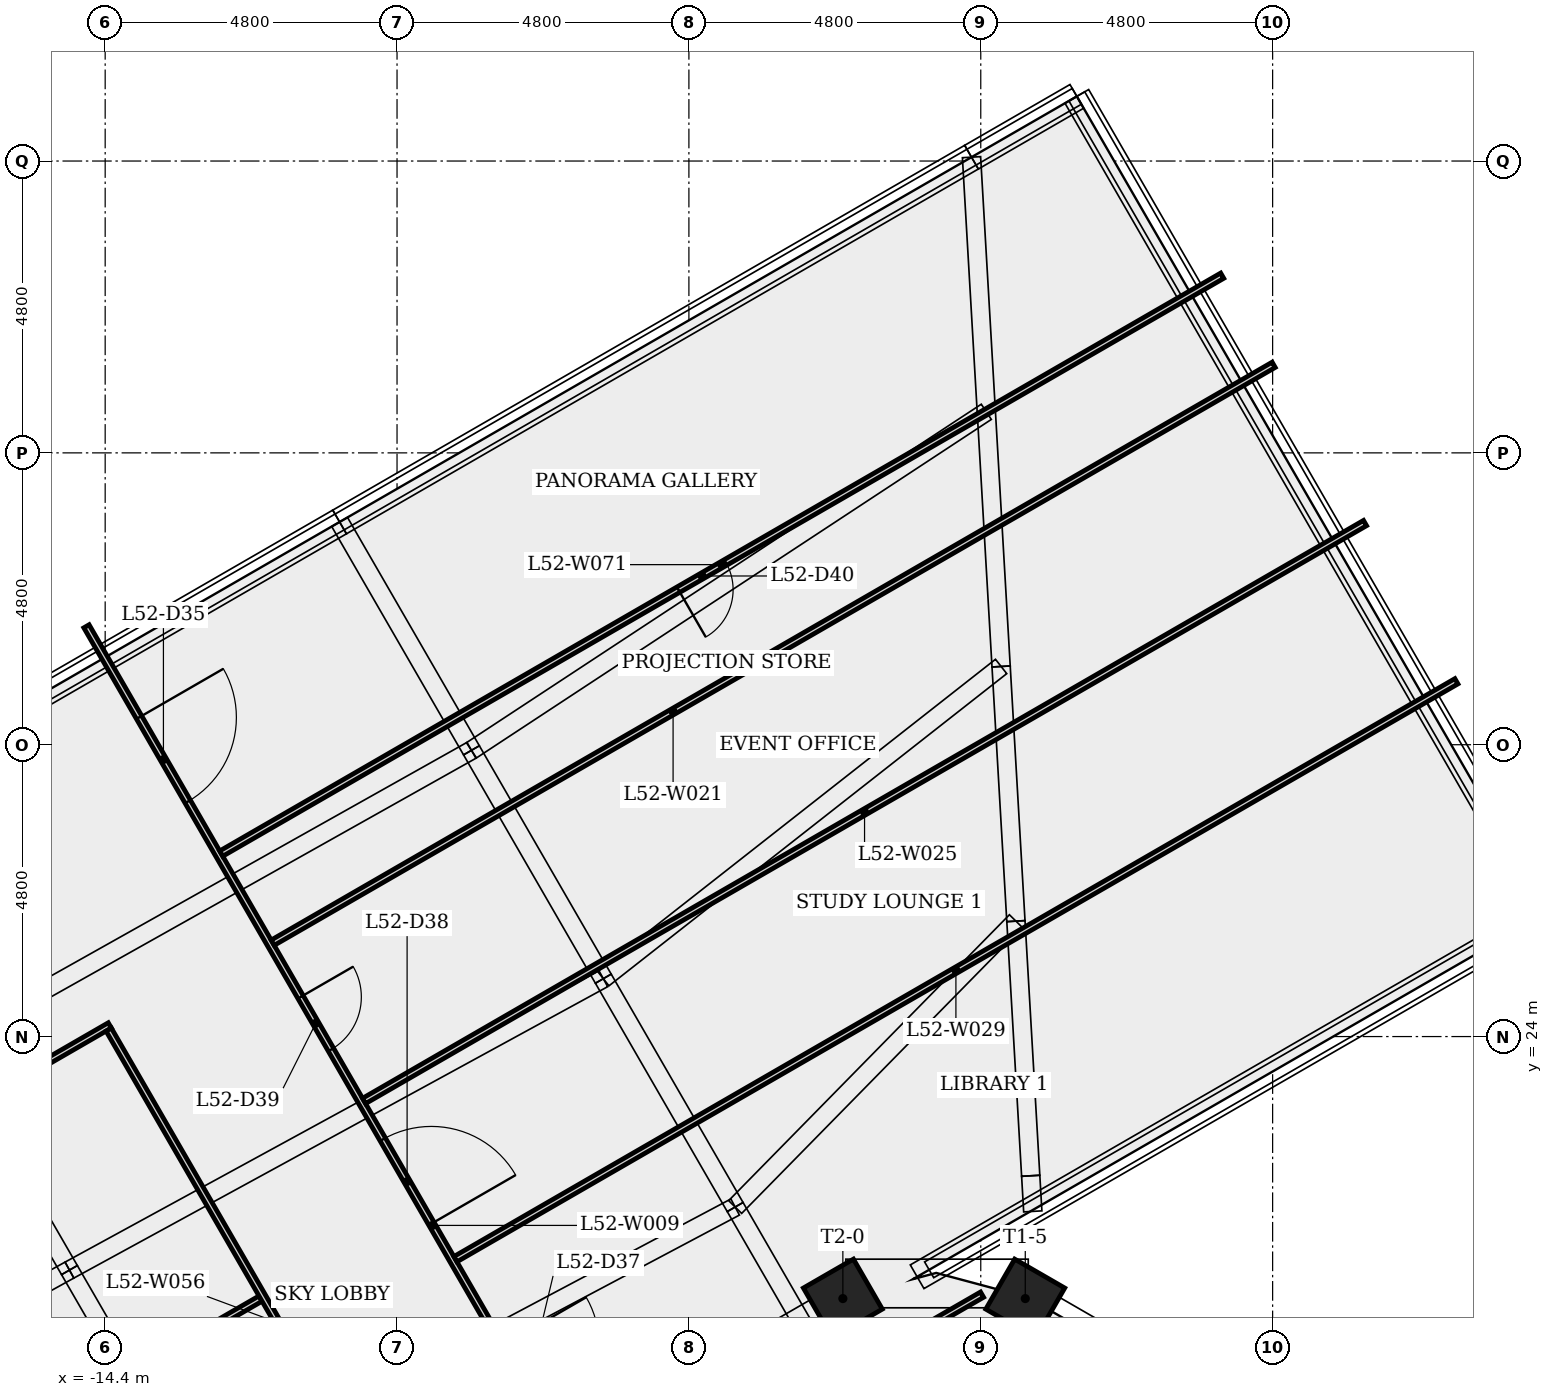
"""IFC4 building model, lengths in metres.
Left out: names, types, materials, properties, quantities, classifications, styles, units other than length and angle.
Written with IfcOpenShell. Run it as: python <this file> out.ifc"""

import sys

from ifc_helpers import new_model, si_unit, direction, frame, frame_2d, origin, origin_2d, place, context, subcontext, project, spatial, rectangle, extrude, element, fill, save


model = new_model("IFC4")
c1 = context("Model", 3, precision=1e-05, world=origin(), true_north=direction((0.0, 1.0)))
c2 = subcontext(c1, "Body", "Model", "MODEL_VIEW")
j1 = project(units=[si_unit("LENGTHUNIT", "METRE"), si_unit("PLANEANGLEUNIT", "RADIAN")], contexts=[c1])
p1 = place(None, origin())
s1 = spatial("IfcSite", under=j1, at=p1, CompositionType="ELEMENT")
p2 = place(p1, origin())
s2 = spatial("IfcBuilding", under=s1, at=p2, CompositionType="ELEMENT")
p3 = place(p2, frame((0.0, 0.0, 194.7)))
s3 = spatial("IfcBuildingStorey", under=s2, at=p3, CompositionType="ELEMENT", Elevation=194.7)
for number, where, z_axis, x_axis in (
    (1, (0.732, 19.691, 0.0), (0.0, 0.0, 1.0), (0.5, 0.866, 0.0)),
    (2, (-2.268, 19.691, 0.0), (0.0, 0.0, 1.0), (-0.5, 0.866, 0.0)),
):
    element("IfcColumn", number, at=place(p3, frame(where, z_axis=z_axis, x_axis=x_axis)), inside=s3, PredefinedType="COLUMN", context=c2, shape_type="SweptSolid", body=[
        extrude(rectangle(XDim=0.95, YDim=0.95, at=origin_2d()), origin(), (0.0, 0.0, 1.0), 4.0),
    ])
p4 = place(p3, frame((-26.639, 11.149, 0.0), z_axis=(0.0, 0.0, 1.0), x_axis=(0.866027084608, 0.499997088717, 0.0)))
e3 = element("IfcWall", 3, at=p4, inside=s3, PredefinedType="PARTITIONING", context=c2, shape_type="SweptSolid", body=[
    extrude(rectangle(XDim=17.083, YDim=0.1, at=frame_2d((8.542, 0.0))), origin(), (0.0, 0.0, 1.0), 3.65),
])
p5 = place(p3, frame((-14.324, 24.184, 0.0), z_axis=(0.0, 0.0, 1.0), x_axis=(-0.866026824701, -0.499997538892, 0.0)))
e4 = element("IfcWall", 4, at=p5, inside=s3, PredefinedType="PARTITIONING", context=c2, shape_type="SweptSolid", body=[
    extrude(rectangle(XDim=17.183, YDim=0.1, at=frame_2d((8.592, 0.0))), origin(), (0.0, 0.0, 1.0), 3.65),
])
p6 = place(p5, frame((7.444, 0.0, 0.0)))
e5 = element("IfcOpeningElement", 5, at=p6, cuts=e4, PredefinedType="OPENING", context=c2, shape_type="SweptSolid", body=[
    extrude(rectangle(XDim=1.6, YDim=2.1, at=frame_2d((0.8, 1.05))), frame((0.0, 0.06, 0.0), z_axis=(0.0, -1.0, 0.0), x_axis=(1.0, 0.0, 0.0)), (0.0, 0.0, 1.0), 0.12),
])
p7 = place(p3, frame((-14.708, 30.748, 0.0), z_axis=(0.0, 0.0, 1.0), x_axis=(0.499993923875, -0.866028911808, 0.0)))
e6 = element("IfcWall", 6, at=p7, inside=s3, PredefinedType="PARTITIONING", context=c2, shape_type="SweptSolid", body=[
    extrude(rectangle(XDim=22.758, YDim=0.1, at=frame_2d((11.379, 0.0))), origin(), (0.0, 0.0, 1.0), 3.65),
])
p8 = place(p7, frame((1.731, 0.0, 0.0)))
e7 = element("IfcOpeningElement", 7, at=p8, cuts=e6, PredefinedType="OPENING", context=c2, shape_type="SweptSolid", body=[
    extrude(rectangle(XDim=1.6, YDim=2.1, at=frame_2d((0.8, 1.05))), frame((0.0, 0.06, 0.0), z_axis=(0.0, -1.0, 0.0), x_axis=(1.0, 0.0, 0.0)), (0.0, 0.0, 1.0), 0.12),
])
p9 = place(p7, frame((19.336, 0.0, 0.0)))
e8 = element("IfcOpeningElement", 8, at=p9, cuts=e6, PredefinedType="OPENING", context=c2, shape_type="SweptSolid", body=[
    extrude(rectangle(XDim=1.0, YDim=2.1, at=frame_2d((0.5, 1.05))), frame((0.0, 0.06, 0.0), z_axis=(0.0, -1.0, 0.0), x_axis=(1.0, 0.0, 0.0)), (0.0, 0.0, 1.0), 0.12),
])
p10 = place(p7, frame((13.667, 0.0, 0.0)))
e9 = element("IfcOpeningElement", 9, at=p10, cuts=e6, PredefinedType="OPENING", context=c2, shape_type="SweptSolid", body=[
    extrude(rectangle(XDim=1.6, YDim=2.1, at=frame_2d((0.8, 1.05))), frame((0.0, 0.06, 0.0), z_axis=(0.0, -1.0, 0.0), x_axis=(1.0, 0.0, 0.0)), (0.0, 0.0, 1.0), 0.12),
])
p11 = place(p7, frame((9.746, 0.0, 0.0)))
e10 = element("IfcOpeningElement", 10, at=p11, cuts=e6, PredefinedType="OPENING", context=c2, shape_type="SweptSolid", body=[
    extrude(rectangle(XDim=1.6, YDim=2.1, at=frame_2d((0.8, 1.05))), frame((0.0, 0.06, 0.0), z_axis=(0.0, -1.0, 0.0), x_axis=(1.0, 0.0, 0.0)), (0.0, 0.0, 1.0), 0.12),
])
p12 = place(p7, frame((7.041, 0.0, 0.0)))
e11 = element("IfcOpeningElement", 11, at=p12, cuts=e6, PredefinedType="OPENING", context=c2, shape_type="SweptSolid", body=[
    extrude(rectangle(XDim=1.0, YDim=2.1, at=frame_2d((0.5, 1.05))), frame((0.0, 0.06, 0.0), z_axis=(0.0, -1.0, 0.0), x_axis=(1.0, 0.0, 0.0)), (0.0, 0.0, 1.0), 0.12),
])
p13 = place(p3, frame((-14.342, 24.115, 0.0), z_axis=(0.0, 0.0, 1.0), x_axis=(0.500000372387, -0.866025188786, 0.0)))
e12 = element("IfcWall", 12, at=p13, inside=s3, PredefinedType="PARTITIONING", context=c2, shape_type="SweptSolid", body=[
    extrude(rectangle(XDim=16.831, YDim=0.1, at=frame_2d((8.415, 0.0))), origin(), (0.0, 0.0, 1.0), 3.65),
])
p14 = place(p13, frame((7.237, 0.0, 0.0)))
e13 = element("IfcOpeningElement", 13, at=p14, cuts=e12, PredefinedType="OPENING", context=c2, shape_type="SweptSolid", body=[
    extrude(rectangle(XDim=1.6, YDim=2.1, at=frame_2d((0.8, 1.05))), frame((0.0, 0.06, 0.0), z_axis=(0.0, -1.0, 0.0), x_axis=(1.0, 0.0, 0.0)), (0.0, 0.0, 1.0), 0.12),
])
p15 = place(p3, frame((-11.645, 25.544, 0.0), z_axis=(0.0, 0.0, 1.0), x_axis=(0.866029456041, 0.49999298122, 0.0)))
e14 = element("IfcWall", 14, at=p15, inside=s3, PredefinedType="PARTITIONING", context=c2, shape_type="SweptSolid", body=[
    extrude(rectangle(XDim=19.009, YDim=0.1, at=frame_2d((9.504, 0.0))), origin(), (0.0, 0.0, 1.0), 3.65),
])
p16 = place(p3, frame((-10.142, 22.941, 0.0), z_axis=(0.0, 0.0, 1.0), x_axis=(0.866020683813, 0.50000817514, 0.0)))
e15 = element("IfcWall", 15, at=p16, inside=s3, PredefinedType="PARTITIONING", context=c2, shape_type="SweptSolid", body=[
    extrude(rectangle(XDim=19.009, YDim=0.1, at=frame_2d((9.504, 0.0))), origin(), (0.0, 0.0, 1.0), 3.275),
])
p17 = place(p3, frame((-8.64, 20.339, 0.0), z_axis=(0.0, 0.0, 1.0), x_axis=(0.866023894726, 0.500002613756, 0.0)))
e16 = element("IfcWall", 16, at=p17, inside=s3, PredefinedType="PARTITIONING", context=c2, shape_type="SweptSolid", body=[
    extrude(rectangle(XDim=19.009, YDim=0.1, at=frame_2d((9.505, 0.0))), origin(), (0.0, 0.0, 1.0), 3.275),
])
p18 = place(p3, frame((-6.222, 16.151, 0.0), z_axis=(0.0, 0.0, 1.0), x_axis=(0.866025419677, 0.499999972474, 0.0)))
e17 = element("IfcWall", 17, at=p18, inside=s3, PredefinedType="PARTITIONING", context=c2, shape_type="SweptSolid", body=[
    extrude(rectangle(XDim=7.209, YDim=0.1, at=frame_2d((3.604, 0.0))), origin(), (0.0, 0.0, 1.0), 3.65),
])
p19 = place(p3, frame((3.971, 36.514, 0.0), z_axis=(0.0, 0.0, 1.0), x_axis=(-0.866026245231, -0.499998542569, 0.0)))
e18 = element("IfcWall", 18, at=p19, inside=s3, PredefinedType="PARTITIONING", context=c2, shape_type="SweptSolid", body=[
    extrude(rectangle(XDim=19.009, YDim=0.1, at=frame_2d((9.504, 0.0))), origin(), (0.0, 0.0, 1.0), 3.275),
])
p20 = place(p19, frame((9.427, 0.0, 0.0)))
e19 = element("IfcOpeningElement", 19, at=p20, cuts=e18, PredefinedType="OPENING", context=c2, shape_type="SweptSolid", body=[
    extrude(rectangle(XDim=0.9, YDim=2.1, at=frame_2d((0.45, 1.05))), frame((0.0, 0.06, 0.0), z_axis=(0.0, -1.0, 0.0), x_axis=(1.0, 0.0, 0.0)), (0.0, 0.0, 1.0), 0.12),
])
p21 = place(p8, origin())
e20 = element("IfcDoor", 20, at=p21, inside=s3, OperationType="SINGLE_SWING_LEFT", PredefinedType="DOOR", context=c2, shape_type="SweptSolid", body=[
    extrude(rectangle(XDim=1.6, YDim=2.1, at=frame_2d((0.8, 1.05))), frame((0.0, 0.025, 0.0), z_axis=(0.0, -1.0, 0.0), x_axis=(1.0, 0.0, 0.0)), (0.0, 0.0, 1.0), 0.05),
])
fill(e7, e20)
p22 = place(p11, origin())
e21 = element("IfcDoor", 21, at=p22, inside=s3, OperationType="SINGLE_SWING_RIGHT", PredefinedType="DOOR", context=c2, shape_type="SweptSolid", body=[
    extrude(rectangle(XDim=1.6, YDim=2.1, at=frame_2d((0.8, 1.05))), frame((0.0, 0.025, 0.0), z_axis=(0.0, -1.0, 0.0), x_axis=(1.0, 0.0, 0.0)), (0.0, 0.0, 1.0), 0.05),
])
fill(e10, e21)
p23 = place(p12, origin())
e22 = element("IfcDoor", 22, at=p23, inside=s3, OperationType="SINGLE_SWING_LEFT", PredefinedType="DOOR", context=c2, shape_type="SweptSolid", body=[
    extrude(rectangle(XDim=1.0, YDim=2.1, at=frame_2d((0.5, 1.05))), frame((0.0, 0.025, 0.0), z_axis=(0.0, -1.0, 0.0), x_axis=(1.0, 0.0, 0.0)), (0.0, 0.0, 1.0), 0.05),
])
fill(e11, e22)
p24 = place(p20, origin())
e23 = element("IfcDoor", 23, at=p24, inside=s3, OperationType="SINGLE_SWING_RIGHT", PredefinedType="DOOR", context=c2, shape_type="SweptSolid", body=[
    extrude(rectangle(XDim=0.9, YDim=2.1, at=frame_2d((0.45, 1.05))), frame((0.0, 0.025, 0.0), z_axis=(0.0, -1.0, 0.0), x_axis=(1.0, 0.0, 0.0)), (0.0, 0.0, 1.0), 0.05),
])
fill(e19, e23)
save(model, sys.argv[1])
